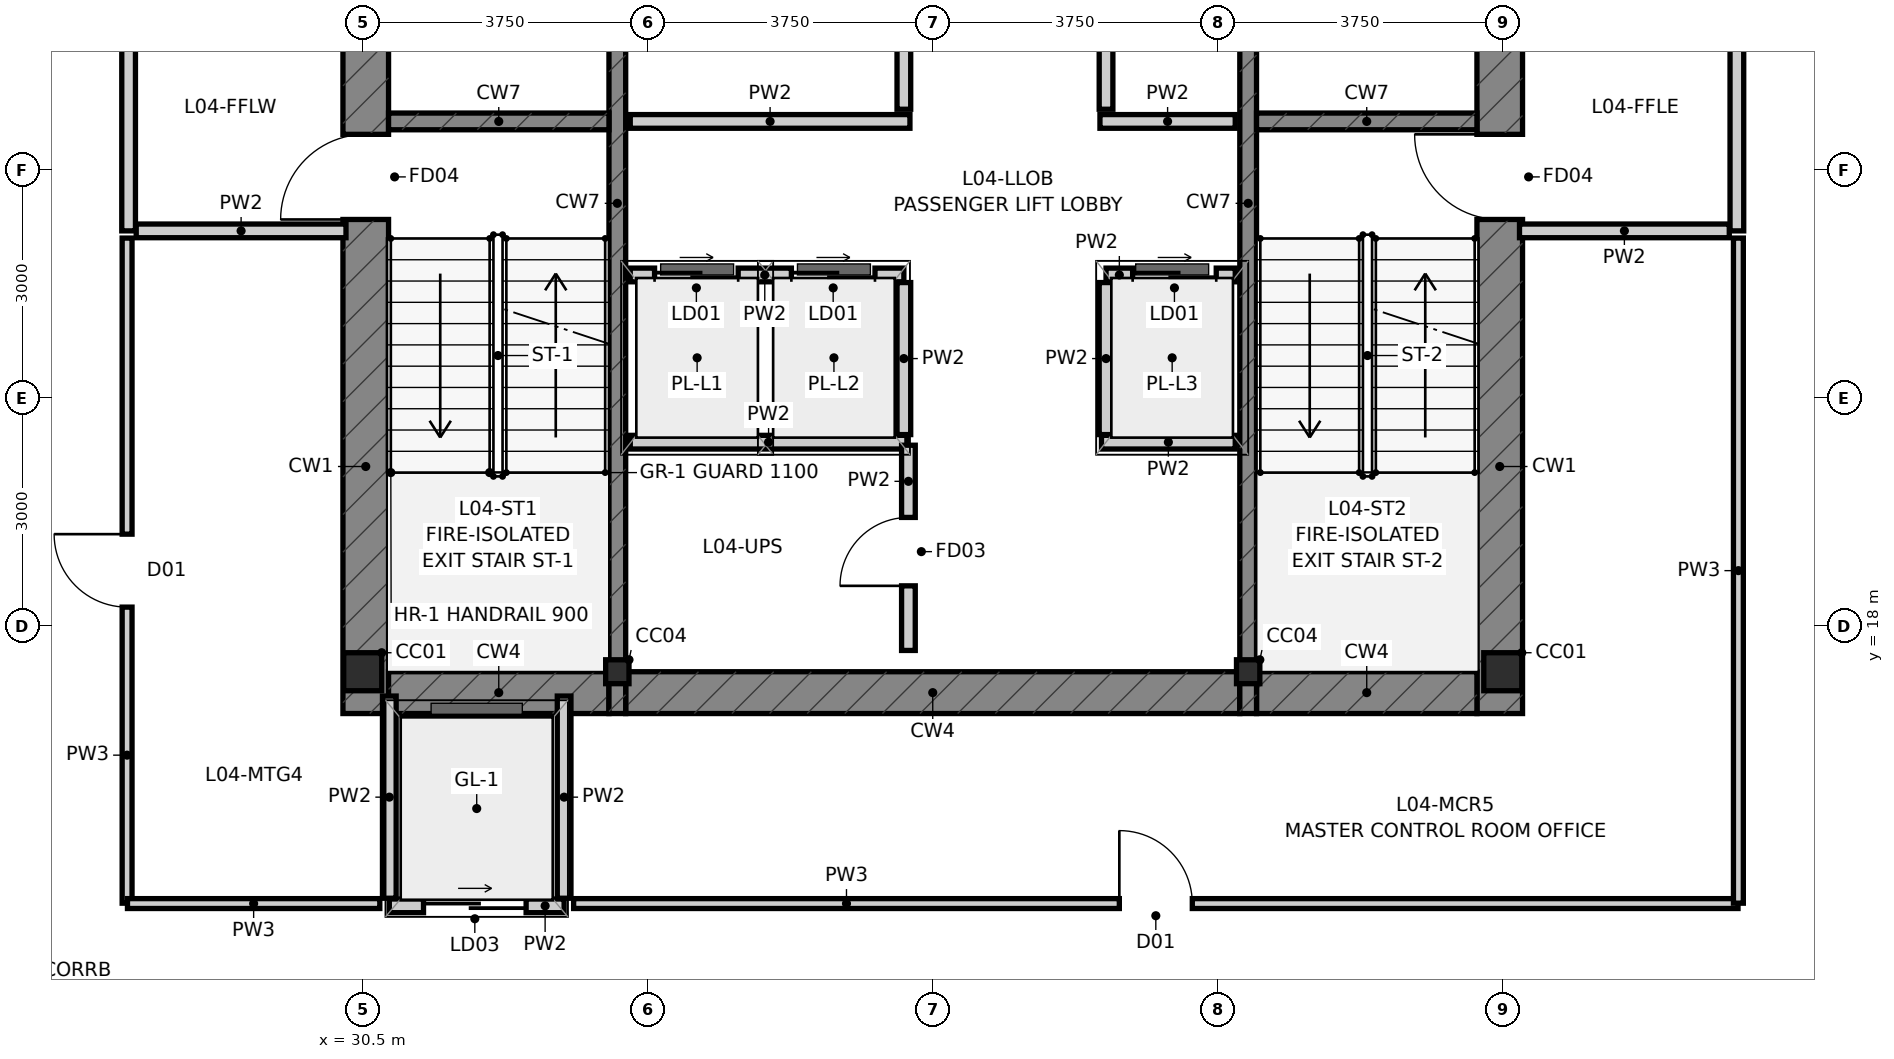
"""IFC4 building model, lengths in metres.
Left out: names, types, materials, properties, quantities, classifications, styles, units other than length and angle.
Written with IfcOpenShell. Run it as: python <this file> out.ifc"""

import sys

from ifc_helpers import new_model, si_unit, direction, frame, frame_2d, origin, origin_2d, place, context, subcontext, project, spatial, rectangle, i_section, extrude, source, transform, mapped, element, fill, save


model = new_model("IFC4")
c1 = context("Model", 3, precision=1e-05, world=origin(), true_north=direction((0.0, 1.0)))
c2 = subcontext(c1, "Body", "Model", "MODEL_VIEW")
j1 = project(units=[si_unit("LENGTHUNIT", "METRE"), si_unit("PLANEANGLEUNIT", "RADIAN")], contexts=[c1])
p1 = place(None, origin())
s1 = spatial("IfcSite", under=j1, at=p1, CompositionType="ELEMENT")
p2 = place(p1, origin())
s2 = spatial("IfcBuilding", under=s1, at=p2, CompositionType="ELEMENT")
p3 = place(p2, frame((0.0, 0.0, 18.9)))
s3 = spatial("IfcBuildingStorey", under=s2, at=p3, CompositionType="ELEMENT", Elevation=18.9)
m1 = source(origin(), c2, "Body", "SweptSolid", [
    extrude(i_section(OverallWidth=0.5, OverallDepth=0.5, WebThickness=0.028, FlangeThickness=0.04, at=origin_2d()), origin(), (0.0, 0.0, 1.0), 4.2),
])
for number, where, z_axis, x_axis in (
    (1, (30.5, 17.4, 0.0), (0.0, 0.0, 1.0), (1.0, 0.0, 0.0)),
    (2, (45.5, 17.4, 0.0), (0.0, 0.0, 1.0), (1.0, 0.0, 0.0)),
):
    element("IfcColumn", number, at=place(p3, frame(where, z_axis=z_axis, x_axis=x_axis)), inside=s3, PredefinedType="COLUMN", context=c2, shape_type="MappedRepresentation", body=[
        mapped(m1, transform((0.0, 0.0, 0.0), scale=1.0)),
    ])
m2 = source(origin(), c2, "Body", "SweptSolid", [
    extrude(i_section(OverallWidth=0.307, OverallDepth=0.315, WebThickness=0.012, FlangeThickness=0.019, at=origin_2d()), origin(), (0.0, 0.0, 1.0), 4.2),
])
for number, where, z_axis, x_axis in (
    (3, (33.85, 17.4, 0.0), (0.0, 0.0, 1.0), (1.0, 0.0, 0.0)),
    (4, (42.15, 17.4, 0.0), (0.0, 0.0, 1.0), (1.0, 0.0, 0.0)),
):
    element("IfcColumn", number, at=place(p3, frame(where, z_axis=z_axis, x_axis=x_axis)), inside=s3, PredefinedType="COLUMN", context=c2, shape_type="MappedRepresentation", body=[
        mapped(m2, transform((0.0, 0.0, 0.0), scale=1.0)),
    ])
p4 = place(p3, frame((30.54, 16.85, 0.0), z_axis=(0.0, 0.0, 1.0), x_axis=(0.0, 1.0, 0.0)))
e5 = element("IfcWall", 5, at=p4, inside=s3, PredefinedType="SHEAR", context=c2, shape_type="SweptSolid", body=[
    extrude(rectangle(XDim=13.425, YDim=0.6, at=frame_2d((6.712, 0.0))), origin(), (0.0, 0.0, 1.0), 4.2),
])
p5 = place(p4, frame((6.5, 0.0, 0.0)))
e6 = element("IfcOpeningElement", 6, at=p5, cuts=e5, PredefinedType="OPENING", context=c2, shape_type="SweptSolid", body=[
    extrude(rectangle(XDim=1.12, YDim=2.15, at=frame_2d((0.56, 1.075))), frame((0.0, 0.312, 0.0), z_axis=(0.0, -1.0, 0.0), x_axis=(1.0, 0.0, 0.0)), (0.0, 0.0, 1.0), 0.624),
])
p6 = place(p4, frame((10.95, 0.0, 0.0)))
e7 = element("IfcOpeningElement", 7, at=p6, cuts=e5, PredefinedType="OPENING", context=c2, shape_type="SweptSolid", body=[
    extrude(rectangle(XDim=1.2, YDim=2.2, at=frame_2d((0.6, 1.1))), frame((0.0, 0.312, 0.0), z_axis=(0.0, -1.0, 0.0), x_axis=(1.0, 0.0, 0.0)), (0.0, 0.0, 1.0), 0.624),
])
p7 = place(p3, frame((45.46, 16.85, 0.0), z_axis=(0.0, 0.0, 1.0), x_axis=(0.0, 1.0, 0.0)))
e8 = element("IfcWall", 8, at=p7, inside=s3, PredefinedType="SHEAR", context=c2, shape_type="SweptSolid", body=[
    extrude(rectangle(XDim=13.425, YDim=0.6, at=frame_2d((6.712, 0.0))), origin(), (0.0, 0.0, 1.0), 4.2),
])
p8 = place(p7, frame((6.5, 0.0, 0.0)))
e9 = element("IfcOpeningElement", 9, at=p8, cuts=e8, PredefinedType="OPENING", context=c2, shape_type="SweptSolid", body=[
    extrude(rectangle(XDim=1.12, YDim=2.15, at=frame_2d((0.56, 1.075))), frame((0.0, 0.312, 0.0), z_axis=(0.0, -1.0, 0.0), x_axis=(1.0, 0.0, 0.0)), (0.0, 0.0, 1.0), 0.624),
])
p9 = place(p7, frame((10.95, 0.0, 0.0)))
e10 = element("IfcOpeningElement", 10, at=p9, cuts=e8, PredefinedType="OPENING", context=c2, shape_type="SweptSolid", body=[
    extrude(rectangle(XDim=1.2, YDim=2.2, at=frame_2d((0.6, 1.1))), frame((0.0, 0.312, 0.0), z_axis=(0.0, -1.0, 0.0), x_axis=(1.0, 0.0, 0.0)), (0.0, 0.0, 1.0), 0.624),
])
p10 = place(p3, frame((30.84, 17.125, 0.0), z_axis=(0.0, 0.0, 1.0), x_axis=(1.0, 0.0, 0.0)))
e11 = element("IfcWall", 11, at=p10, inside=s3, PredefinedType="SHEAR", context=c2, shape_type="SweptSolid", body=[
    extrude(rectangle(XDim=2.9, YDim=0.55, at=frame_2d((1.45, 0.0))), origin(), (0.0, 0.0, 1.0), 4.2),
])
p11 = place(p3, frame((33.96, 17.125, 0.0), z_axis=(0.0, 0.0, 1.0), x_axis=(1.0, 0.0, 0.0)))
e12 = element("IfcWall", 12, at=p11, inside=s3, PredefinedType="SHEAR", context=c2, shape_type="SweptSolid", body=[
    extrude(rectangle(XDim=8.08, YDim=0.55, at=frame_2d((4.04, 0.0))), origin(), (0.0, 0.0, 1.0), 4.2),
])
p12 = place(p3, frame((42.26, 17.125, 0.0), z_axis=(0.0, 0.0, 1.0), x_axis=(1.0, 0.0, 0.0)))
e13 = element("IfcWall", 13, at=p12, inside=s3, PredefinedType="SHEAR", context=c2, shape_type="SweptSolid", body=[
    extrude(rectangle(XDim=2.9, YDim=0.55, at=frame_2d((1.45, 0.0))), origin(), (0.0, 0.0, 1.0), 4.2),
])
for number, where, z_axis, x_axis in (
    (14, (33.85, 16.85, 0.0), (0.0, 0.0, 1.0), (0.0, 1.0, 0.0)),
    (15, (42.15, 16.85, 0.0), (0.0, 0.0, 1.0), (0.0, 1.0, 0.0)),
):
    element("IfcWall", number, at=place(p3, frame(where, z_axis=z_axis, x_axis=x_axis)), inside=s3, PredefinedType="SHEAR", context=c2, shape_type="SweptSolid", body=[
        extrude(rectangle(XDim=13.425, YDim=0.22, at=frame_2d((6.712, 0.0))), origin(), (0.0, 0.0, 1.0), 4.2),
    ])
for number, where, z_axis, x_axis in (
    (16, (30.84, 24.64, 0.0), (0.0, 0.0, 1.0), (1.0, 0.0, 0.0)),
    (17, (42.26, 24.64, 0.0), (0.0, 0.0, 1.0), (1.0, 0.0, 0.0)),
):
    element("IfcWall", number, at=place(p3, frame(where, z_axis=z_axis, x_axis=x_axis)), inside=s3, PredefinedType="SHEAR", context=c2, shape_type="SweptSolid", body=[
        extrude(rectangle(XDim=2.9, YDim=0.22, at=frame_2d((1.45, 0.0))), origin(), (0.0, 0.0, 1.0), 4.2),
    ])
p13 = place(p3, frame((30.85, 14.32, 0.0), z_axis=(0.0, 0.0, 1.0), x_axis=(1.0, 0.0, 0.0)))
e18 = element("IfcWall", 18, at=p13, inside=s3, PredefinedType="PARTITIONING", context=c2, shape_type="SweptSolid", body=[
    extrude(rectangle(XDim=2.3, YDim=0.18, at=frame_2d((1.15, 0.0))), origin(), (0.0, 0.0, 1.0), 3.75),
])
p14 = place(p13, frame((0.45, 0.0, 0.0)))
e19 = element("IfcOpeningElement", 19, at=p14, cuts=e18, PredefinedType="OPENING", context=c2, shape_type="SweptSolid", body=[
    extrude(rectangle(XDim=1.35, YDim=2.25, at=frame_2d((0.675, 1.125))), frame((0.0, 0.102, 0.0), z_axis=(0.0, -1.0, 0.0), x_axis=(1.0, 0.0, 0.0)), (0.0, 0.0, 1.0), 0.204),
])
p15 = place(p3, frame((30.85, 14.42, 0.0), z_axis=(0.0, 0.0, 1.0), x_axis=(0.0, 1.0, 0.0)))
e20 = element("IfcWall", 20, at=p15, inside=s3, PredefinedType="PARTITIONING", context=c2, shape_type="SweptSolid", body=[
    extrude(rectangle(XDim=2.66, YDim=0.18, at=frame_2d((1.33, 0.0))), origin(), (0.0, 0.0, 1.0), 3.124),
])
p16 = place(p3, frame((33.15, 14.42, 0.0), z_axis=(0.0, 0.0, 1.0), x_axis=(0.0, 1.0, 0.0)))
e21 = element("IfcWall", 21, at=p16, inside=s3, PredefinedType="PARTITIONING", context=c2, shape_type="SweptSolid", body=[
    extrude(rectangle(XDim=2.66, YDim=0.18, at=frame_2d((1.33, 0.0))), origin(), (0.0, 0.0, 1.0), 3.75),
])
p17 = place(p3, frame((34.02, 22.62, 0.0), z_axis=(0.0, 0.0, 1.0), x_axis=(1.0, 0.0, 0.0)))
e22 = element("IfcWall", 22, at=p17, inside=s3, PredefinedType="PARTITIONING", context=c2, shape_type="SweptSolid", body=[
    extrude(rectangle(XDim=3.6, YDim=0.18, at=frame_2d((1.8, 0.0))), origin(), (0.0, 0.0, 1.0), 3.75),
])
p18 = place(p17, frame((0.32, 0.0, 0.0)))
e23 = element("IfcOpeningElement", 23, at=p18, cuts=e22, PredefinedType="OPENING", context=c2, shape_type="SweptSolid", body=[
    extrude(rectangle(XDim=1.1, YDim=2.2, at=frame_2d((0.55, 1.1))), frame((0.0, 0.102, 0.0), z_axis=(0.0, -1.0, 0.0), x_axis=(1.0, 0.0, 0.0)), (0.0, 0.0, 1.0), 0.204),
])
p19 = place(p17, frame((2.12, 0.0, 0.0)))
e24 = element("IfcOpeningElement", 24, at=p19, cuts=e22, PredefinedType="OPENING", context=c2, shape_type="SweptSolid", body=[
    extrude(rectangle(XDim=1.1, YDim=2.2, at=frame_2d((0.55, 1.1))), frame((0.0, 0.102, 0.0), z_axis=(0.0, -1.0, 0.0), x_axis=(1.0, 0.0, 0.0)), (0.0, 0.0, 1.0), 0.204),
])
p20 = place(p3, frame((40.28, 22.62, 0.0), z_axis=(0.0, 0.0, 1.0), x_axis=(1.0, 0.0, 0.0)))
e25 = element("IfcWall", 25, at=p20, inside=s3, PredefinedType="PARTITIONING", context=c2, shape_type="SweptSolid", body=[
    extrude(rectangle(XDim=1.7, YDim=0.18, at=frame_2d((0.85, 0.0))), origin(), (0.0, 0.0, 1.0), 3.75),
])
p21 = place(p20, frame((0.35, 0.0, 0.0)))
e26 = element("IfcOpeningElement", 26, at=p21, cuts=e25, PredefinedType="OPENING", context=c2, shape_type="SweptSolid", body=[
    extrude(rectangle(XDim=1.1, YDim=2.2, at=frame_2d((0.55, 1.1))), frame((0.0, 0.102, 0.0), z_axis=(0.0, -1.0, 0.0), x_axis=(1.0, 0.0, 0.0)), (0.0, 0.0, 1.0), 0.204),
])
for number, where, z_axis, x_axis in (
    (27, (37.62, 20.52, 0.0), (0.0, 0.0, 1.0), (0.0, 1.0, 0.0)),
    (28, (40.28, 20.52, 0.0), (0.0, 0.0, 1.0), (0.0, 1.0, 0.0)),
    (29, (37.62, 24.8, 0.0), (0.0, 0.0, 1.0), (0.0, 1.0, 0.0)),
    (30, (40.28, 24.8, 0.0), (0.0, 0.0, 1.0), (0.0, 1.0, 0.0)),
):
    element("IfcWall", number, at=place(p3, frame(where, z_axis=z_axis, x_axis=x_axis)), inside=s3, PredefinedType="PARTITIONING", context=c2, shape_type="SweptSolid", body=[
        extrude(rectangle(XDim=2.0, YDim=0.18, at=frame_2d((1.0, 0.0))), origin(), (0.0, 0.0, 1.0), 3.75),
    ])
p22 = place(p3, frame((34.02, 24.64, 0.0), z_axis=(0.0, 0.0, 1.0), x_axis=(1.0, 0.0, 0.0)))
e31 = element("IfcWall", 31, at=p22, inside=s3, PredefinedType="PARTITIONING", context=c2, shape_type="SweptSolid", body=[
    extrude(rectangle(XDim=3.68, YDim=0.18, at=frame_2d((1.84, 0.0))), origin(), (0.0, 0.0, 1.0), 3.75),
])
p23 = place(p3, frame((40.2, 24.64, 0.0), z_axis=(0.0, 0.0, 1.0), x_axis=(1.0, 0.0, 0.0)))
e32 = element("IfcWall", 32, at=p23, inside=s3, PredefinedType="PARTITIONING", context=c2, shape_type="SweptSolid", body=[
    extrude(rectangle(XDim=1.78, YDim=0.18, at=frame_2d((0.89, 0.0))), origin(), (0.0, 0.0, 1.0), 3.75),
])
p24 = place(p3, frame((27.42, 23.2, 0.0), z_axis=(0.0, 0.0, 1.0), x_axis=(0.0, 1.0, 0.0)))
e33 = element("IfcWall", 33, at=p24, inside=s3, PredefinedType="PARTITIONING", context=c2, shape_type="SweptSolid", body=[
    extrude(rectangle(XDim=6.4, YDim=0.18, at=frame_2d((3.2, 0.0))), origin(), (0.0, 0.0, 1.0), 3.376),
])
p25 = place(p24, frame((2.65, 0.0, 0.0)))
e34 = element("IfcOpeningElement", 34, at=p25, cuts=e33, PredefinedType="OPENING", context=c2, shape_type="SweptSolid", body=[
    extrude(rectangle(XDim=1.05, YDim=2.15, at=frame_2d((0.525, 1.075))), frame((0.0, 0.102, 0.0), z_axis=(0.0, -1.0, 0.0), x_axis=(1.0, 0.0, 0.0)), (0.0, 0.0, 1.0), 0.204),
])
p26 = place(p3, frame((27.52, 23.2, 0.0), z_axis=(0.0, 0.0, 1.0), x_axis=(1.0, 0.0, 0.0)))
e35 = element("IfcWall", 35, at=p26, inside=s3, PredefinedType="PARTITIONING", context=c2, shape_type="SweptSolid", body=[
    extrude(rectangle(XDim=2.76, YDim=0.18, at=frame_2d((1.38, 0.0))), origin(), (0.0, 0.0, 1.0), 3.75),
])
p27 = place(p3, frame((48.58, 23.2, 0.0), z_axis=(0.0, 0.0, 1.0), x_axis=(0.0, 1.0, 0.0)))
e36 = element("IfcWall", 36, at=p27, inside=s3, PredefinedType="PARTITIONING", context=c2, shape_type="SweptSolid", body=[
    extrude(rectangle(XDim=6.4, YDim=0.18, at=frame_2d((3.2, 0.0))), origin(), (0.0, 0.0, 1.0), 3.75),
])
p28 = place(p27, frame((2.65, 0.0, 0.0)))
e37 = element("IfcOpeningElement", 37, at=p28, cuts=e36, PredefinedType="OPENING", context=c2, shape_type="SweptSolid", body=[
    extrude(rectangle(XDim=1.05, YDim=2.15, at=frame_2d((0.525, 1.075))), frame((0.0, 0.102, 0.0), z_axis=(0.0, -1.0, 0.0), x_axis=(1.0, 0.0, 0.0)), (0.0, 0.0, 1.0), 0.204),
])
p29 = place(p3, frame((45.72, 23.2, 0.0), z_axis=(0.0, 0.0, 1.0), x_axis=(1.0, 0.0, 0.0)))
e38 = element("IfcWall", 38, at=p29, inside=s3, PredefinedType="PARTITIONING", context=c2, shape_type="SweptSolid", body=[
    extrude(rectangle(XDim=2.76, YDim=0.18, at=frame_2d((1.38, 0.0))), origin(), (0.0, 0.0, 1.0), 3.75),
])
p30 = place(p3, frame((34.02, 20.42, 0.0), z_axis=(0.0, 0.0, 1.0), x_axis=(1.0, 0.0, 0.0)))
e39 = element("IfcWall", 39, at=p30, inside=s3, PredefinedType="PARTITIONING", context=c2, shape_type="SweptSolid", body=[
    extrude(rectangle(XDim=3.64, YDim=0.18, at=frame_2d((1.82, 0.0))), origin(), (0.0, 0.0, 1.0), 3.75),
])
p31 = place(p3, frame((40.22, 20.42, 0.0), z_axis=(0.0, 0.0, 1.0), x_axis=(1.0, 0.0, 0.0)))
e40 = element("IfcWall", 40, at=p31, inside=s3, PredefinedType="PARTITIONING", context=c2, shape_type="SweptSolid", body=[
    extrude(rectangle(XDim=1.76, YDim=0.18, at=frame_2d((0.88, 0.0))), origin(), (0.0, 0.0, 1.0), 3.75),
])
p32 = place(p3, frame((37.68, 17.68, 0.0), z_axis=(0.0, 0.0, 1.0), x_axis=(0.0, 1.0, 0.0)))
e41 = element("IfcWall", 41, at=p32, inside=s3, PredefinedType="PARTITIONING", context=c2, shape_type="SweptSolid", body=[
    extrude(rectangle(XDim=2.7, YDim=0.18, at=frame_2d((1.35, 0.0))), origin(), (0.0, 0.0, 1.0), 3.75),
])
p33 = place(p32, frame((0.85, 0.0, 0.0)))
e42 = element("IfcOpeningElement", 42, at=p33, cuts=e41, PredefinedType="OPENING", context=c2, shape_type="SweptSolid", body=[
    extrude(rectangle(XDim=0.9, YDim=2.1, at=frame_2d((0.45, 1.05))), frame((0.0, 0.102, 0.0), z_axis=(0.0, -1.0, 0.0), x_axis=(1.0, 0.0, 0.0)), (0.0, 0.0, 1.0), 0.204),
])
p34 = place(p3, frame((33.275, 14.35, 0.0), z_axis=(0.0, 0.0, 1.0), x_axis=(1.0, 0.0, 0.0)))
e43 = element("IfcWall", 43, at=p34, inside=s3, PredefinedType="PARTITIONING", context=c2, shape_type="SweptSolid", body=[
    extrude(rectangle(XDim=15.32, YDim=0.13, at=frame_2d((7.66, 0.0))), origin(), (0.0, 0.0, 1.0), 3.75),
])
p35 = place(p34, frame((7.18, 0.0, 0.0)))
e44 = element("IfcOpeningElement", 44, at=p35, cuts=e43, PredefinedType="OPENING", context=c2, shape_type="SweptSolid", body=[
    extrude(rectangle(XDim=0.96, YDim=2.15, at=frame_2d((0.48, 1.075))), frame((0.0, 0.077, 0.0), z_axis=(0.0, -1.0, 0.0), x_axis=(1.0, 0.0, 0.0)), (0.0, 0.0, 1.0), 0.154),
])
p36 = place(p3, frame((27.4, 14.355, 0.0), z_axis=(0.0, 0.0, 1.0), x_axis=(0.0, 1.0, 0.0)))
e45 = element("IfcWall", 45, at=p36, inside=s3, PredefinedType="PARTITIONING", context=c2, shape_type="SweptSolid", body=[
    extrude(rectangle(XDim=8.75, YDim=0.13, at=frame_2d((4.375, 0.0))), origin(), (0.0, 0.0, 1.0), 3.376),
])
p37 = place(p36, frame((3.895, 0.0, 0.0)))
e46 = element("IfcOpeningElement", 46, at=p37, cuts=e45, PredefinedType="OPENING", context=c2, shape_type="SweptSolid", body=[
    extrude(rectangle(XDim=0.96, YDim=2.15, at=frame_2d((0.48, 1.075))), frame((0.0, 0.077, 0.0), z_axis=(0.0, -1.0, 0.0), x_axis=(1.0, 0.0, 0.0)), (0.0, 0.0, 1.0), 0.154),
])
p38 = place(p3, frame((48.6, 14.355, 0.0), z_axis=(0.0, 0.0, 1.0), x_axis=(0.0, 1.0, 0.0)))
e47 = element("IfcWall", 47, at=p38, inside=s3, PredefinedType="PARTITIONING", context=c2, shape_type="SweptSolid", body=[
    extrude(rectangle(XDim=8.75, YDim=0.13, at=frame_2d((4.375, 0.0))), origin(), (0.0, 0.0, 1.0), 3.75),
])
p39 = place(p3, frame((30.725, 14.35, 0.0), z_axis=(0.0, 0.0, 1.0), x_axis=(-1.0, 0.0, 0.0)))
e48 = element("IfcWall", 48, at=p39, inside=s3, PredefinedType="PARTITIONING", context=c2, shape_type="SweptSolid", body=[
    extrude(rectangle(XDim=3.32, YDim=0.13, at=frame_2d((1.66, 0.0))), origin(), (0.0, 0.0, 1.0), 3.75),
])
p40 = place(p5, origin())
e49 = element("IfcDoor", 49, at=p40, inside=s3, OperationType="SINGLE_SWING_LEFT", PredefinedType="DOOR", context=c2, shape_type="SweptSolid", body=[
    extrude(rectangle(XDim=1.12, YDim=2.15, at=frame_2d((0.56, 1.075))), frame((0.0, 0.025, 0.0), z_axis=(0.0, -1.0, 0.0), x_axis=(1.0, 0.0, 0.0)), (0.0, 0.0, 1.0), 0.05),
])
fill(e6, e49)
p41 = place(p8, origin())
e50 = element("IfcDoor", 50, at=p41, inside=s3, OperationType="SINGLE_SWING_RIGHT", PredefinedType="DOOR", context=c2, shape_type="SweptSolid", body=[
    extrude(rectangle(XDim=1.12, YDim=2.15, at=frame_2d((0.56, 1.075))), frame((0.0, 0.025, 0.0), z_axis=(0.0, -1.0, 0.0), x_axis=(1.0, 0.0, 0.0)), (0.0, 0.0, 1.0), 0.05),
])
fill(e9, e50)
p42 = place(p14, origin())
e51 = element("IfcDoor", 51, at=p42, inside=s3, OperationType="SLIDING_TO_LEFT", PredefinedType="DOOR", context=c2, shape_type="SweptSolid", body=[
    extrude(rectangle(XDim=1.35, YDim=2.25, at=frame_2d((0.675, 1.125))), frame((0.0, 0.025, 0.0), z_axis=(0.0, -1.0, 0.0), x_axis=(1.0, 0.0, 0.0)), (0.0, 0.0, 1.0), 0.05),
])
fill(e19, e51)
p43 = place(p18, origin())
e52 = element("IfcDoor", 52, at=p43, inside=s3, OperationType="SLIDING_TO_LEFT", PredefinedType="DOOR", context=c2, shape_type="SweptSolid", body=[
    extrude(rectangle(XDim=1.1, YDim=2.2, at=frame_2d((0.55, 1.1))), frame((0.0, 0.025, 0.0), z_axis=(0.0, -1.0, 0.0), x_axis=(1.0, 0.0, 0.0)), (0.0, 0.0, 1.0), 0.05),
])
fill(e23, e52)
p44 = place(p19, origin())
e53 = element("IfcDoor", 53, at=p44, inside=s3, OperationType="SLIDING_TO_RIGHT", PredefinedType="DOOR", context=c2, shape_type="SweptSolid", body=[
    extrude(rectangle(XDim=1.1, YDim=2.2, at=frame_2d((0.55, 1.1))), frame((0.0, 0.025, 0.0), z_axis=(0.0, -1.0, 0.0), x_axis=(1.0, 0.0, 0.0)), (0.0, 0.0, 1.0), 0.05),
])
fill(e24, e53)
p45 = place(p21, origin())
e54 = element("IfcDoor", 54, at=p45, inside=s3, OperationType="SLIDING_TO_LEFT", PredefinedType="DOOR", context=c2, shape_type="SweptSolid", body=[
    extrude(rectangle(XDim=1.1, YDim=2.2, at=frame_2d((0.55, 1.1))), frame((0.0, 0.025, 0.0), z_axis=(0.0, -1.0, 0.0), x_axis=(1.0, 0.0, 0.0)), (0.0, 0.0, 1.0), 0.05),
])
fill(e26, e54)
p46 = place(p33, origin())
e55 = element("IfcDoor", 55, at=p46, inside=s3, OperationType="SINGLE_SWING_LEFT", PredefinedType="DOOR", context=c2, shape_type="SweptSolid", body=[
    extrude(rectangle(XDim=0.9, YDim=2.1, at=frame_2d((0.45, 1.05))), frame((0.0, 0.025, 0.0), z_axis=(0.0, -1.0, 0.0), x_axis=(1.0, 0.0, 0.0)), (0.0, 0.0, 1.0), 0.05),
])
fill(e42, e55)
p47 = place(p35, origin())
e56 = element("IfcDoor", 56, at=p47, inside=s3, OperationType="SINGLE_SWING_LEFT", PredefinedType="DOOR", context=c2, shape_type="SweptSolid", body=[
    extrude(rectangle(XDim=0.96, YDim=2.15, at=frame_2d((0.48, 1.075))), frame((0.0, 0.025, 0.0), z_axis=(0.0, -1.0, 0.0), x_axis=(1.0, 0.0, 0.0)), (0.0, 0.0, 1.0), 0.05),
])
fill(e44, e56)
p48 = place(p37, origin())
e57 = element("IfcDoor", 57, at=p48, inside=s3, OperationType="SINGLE_SWING_RIGHT", PredefinedType="DOOR", context=c2, shape_type="SweptSolid", body=[
    extrude(rectangle(XDim=0.96, YDim=2.15, at=frame_2d((0.48, 1.075))), frame((0.0, 0.025, 0.0), z_axis=(0.0, -1.0, 0.0), x_axis=(1.0, 0.0, 0.0)), (0.0, 0.0, 1.0), 0.05),
])
fill(e46, e57)
save(model, sys.argv[1])
